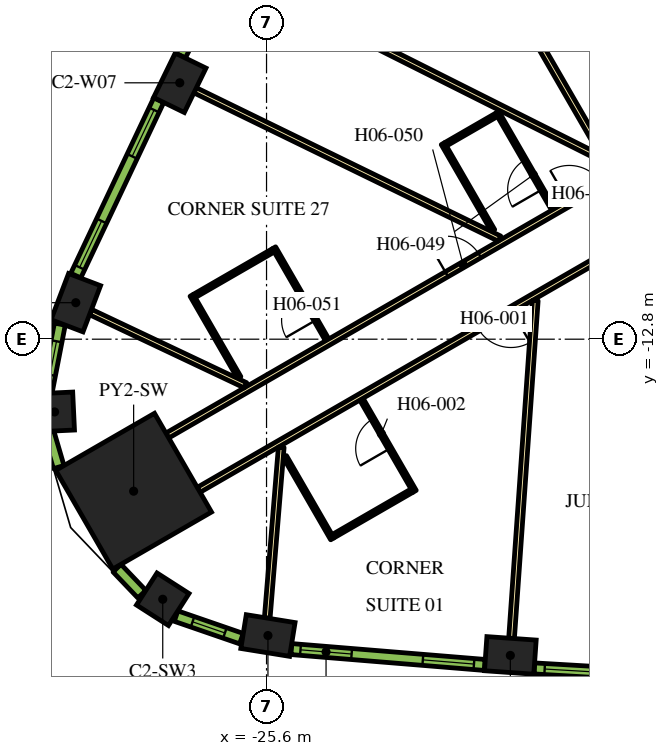
"""IFC4 building model, lengths in metres.
Left out: names, types, materials, properties, quantities, classifications, styles, units other than length and angle.
Written with IfcOpenShell. Run it as: python <this file> out.ifc"""

import sys

from ifc_helpers import new_model, si_unit, direction, frame, frame_2d, origin, origin_2d, place, context, subcontext, project, spatial, rectangle, extrude, element, fill, save


model = new_model("IFC4")
c1 = context("Model", 3, precision=1e-05, world=origin(), true_north=direction((0.0, 1.0)))
c2 = subcontext(c1, "Body", "Model", "MODEL_VIEW")
j1 = project(units=[si_unit("LENGTHUNIT", "METRE"), si_unit("PLANEANGLEUNIT", "RADIAN")], contexts=[c1])
p1 = place(None, origin())
s1 = spatial("IfcSite", under=j1, at=p1, CompositionType="ELEMENT")
p2 = place(p1, origin())
s2 = spatial("IfcBuilding", under=s1, at=p2, CompositionType="ELEMENT")
p3 = place(p2, frame((0.0, 0.0, 87.6)))
s3 = spatial("IfcBuildingStorey", under=s2, at=p3, CompositionType="ELEMENT", Elevation=87.6)
p4 = place(p3, frame((-29.097, -16.799, 0.0), z_axis=(0.0, 0.0, 1.0), x_axis=(-0.866025403784, -0.5, 0.0)))
e1 = element("IfcColumn", 1, at=p4, inside=s3, PredefinedType="COLUMN", context=c2, shape_type="SweptSolid", body=[
    extrude(rectangle(XDim=3.0, YDim=3.0, at=origin_2d()), origin(), (0.0, 0.0, 1.0), 3.9),
])
for number, where, z_axis, x_axis in (
    (2, (-25.563, -20.597, 0.0), (0.0, 0.0, 1.0), (0.987, -0.159, 0.0)),
    (3, (-19.184, -21.12, 0.0), (0.0, 0.0, 1.0), (0.998, -0.07, 0.0)),
    (4, (-27.883, -6.054, 0.0), (0.0, 0.0, 1.0), (-0.438, -0.899, 0.0)),
    (5, (-30.619, -11.839, 0.0), (0.0, 0.0, 1.0), (-0.355, -0.935, 0.0)),
):
    element("IfcColumn", number, at=place(p3, frame(where, z_axis=z_axis, x_axis=x_axis)), inside=s3, PredefinedType="COLUMN", context=c2, shape_type="SweptSolid", body=[
        extrude(rectangle(XDim=1.3, YDim=0.9, at=origin_2d()), origin(), (0.0, 0.0, 1.0), 3.9),
    ])
for number, where, z_axis, x_axis in (
    (6, (-31.177, -14.714, 0.0), (0.0, 0.0, 1.0), (0.047, -0.999, 0.0)),
    (7, (-28.331, -19.643, 0.0), (0.0, 0.0, 1.0), (0.842, -0.54, 0.0)),
):
    element("IfcColumn", number, at=place(p3, frame(where, z_axis=z_axis, x_axis=x_axis)), inside=s3, PredefinedType="COLUMN", context=c2, shape_type="SweptSolid", body=[
        extrude(rectangle(XDim=1.0, YDim=1.0, at=origin_2d()), origin(), (0.0, 0.0, 1.0), 3.9),
    ])
p5 = place(p3, frame((-12.134, -11.883, 0.0), z_axis=(0.0, 0.0, 1.0), x_axis=(-0.500005339912, 0.866022320763, 0.0)))
e8 = element("IfcWall", 8, at=p5, inside=s3, PredefinedType="SOLIDWALL", context=c2, shape_type="SweptSolid", body=[
    extrude(rectangle(XDim=9.488, YDim=0.9, at=frame_2d((4.744, 0.0))), origin(), (0.0, 0.0, 1.0), 3.9),
])
p6 = place(p3, frame((-16.412, -8.523, 0.0), z_axis=(0.0, 0.0, 1.0), x_axis=(-0.500001929737, 0.866024289647, 0.0)))
e9 = element("IfcWall", 9, at=p6, inside=s3, PredefinedType="PARTITIONING", context=c2, shape_type="SweptSolid", body=[
    extrude(rectangle(XDim=5.268, YDim=0.15, at=frame_2d((2.634, 0.0))), origin(), (0.0, 0.0, 1.0), 2.75),
])
p7 = place(p3, frame((-28.211, -15.335, 0.0), z_axis=(0.0, 0.0, 1.0), x_axis=(0.866025884867, 0.49999916674, 0.0)))
e10 = element("IfcWall", 10, at=p7, inside=s3, PredefinedType="PARTITIONING", context=c2, shape_type="SweptSolid", body=[
    extrude(rectangle(XDim=13.543, YDim=0.15, at=frame_2d((6.772, 0.0))), origin(), (0.0, 0.0, 1.0), 2.75),
])
p8 = place(p7, frame((12.214, 0.0, 0.0)))
e11 = element("IfcOpeningElement", 11, at=p8, cuts=e10, PredefinedType="OPENING", context=c2, shape_type="SweptSolid", body=[
    extrude(rectangle(XDim=1.0, YDim=2.1, at=frame_2d((0.5, 1.05))), frame((0.0, 0.085, 0.0), z_axis=(0.0, -1.0, 0.0), x_axis=(1.0, 0.0, 0.0)), (0.0, 0.0, 1.0), 0.17),
])
p9 = place(p7, frame((8.488, 0.0, 0.0)))
e12 = element("IfcOpeningElement", 12, at=p9, cuts=e10, PredefinedType="OPENING", context=c2, shape_type="SweptSolid", body=[
    extrude(rectangle(XDim=1.0, YDim=2.1, at=frame_2d((0.5, 1.05))), frame((0.0, 0.085, 0.0), z_axis=(0.0, -1.0, 0.0), x_axis=(1.0, 0.0, 0.0)), (0.0, 0.0, 1.0), 0.17),
])
p10 = place(p3, frame((-15.587, -9.952, 0.0), z_axis=(0.0, 0.0, 1.0), x_axis=(-0.866017869832, -0.500013048961, 0.0)))
e13 = element("IfcWall", 13, at=p10, inside=s3, PredefinedType="PARTITIONING", context=c2, shape_type="SweptSolid", body=[
    extrude(rectangle(XDim=13.624, YDim=0.15, at=frame_2d((6.812, 0.0))), origin(), (0.0, 0.0, 1.0), 2.75),
])
p11 = place(p10, frame((4.134, 0.0, 0.0)))
e14 = element("IfcOpeningElement", 14, at=p11, cuts=e13, PredefinedType="OPENING", context=c2, shape_type="SweptSolid", body=[
    extrude(rectangle(XDim=1.0, YDim=2.1, at=frame_2d((0.5, 1.05))), frame((0.0, 0.085, 0.0), z_axis=(0.0, -1.0, 0.0), x_axis=(1.0, 0.0, 0.0)), (0.0, 0.0, 1.0), 0.17),
])
p12 = place(p3, frame((-30.231, -12.085, 0.0), z_axis=(0.0, 0.0, 1.0), x_axis=(0.904001132572, -0.427530060122, 0.0)))
e15 = element("IfcWall", 15, at=p12, inside=s3, PredefinedType="PARTITIONING", context=c2, shape_type="SweptSolid", body=[
    extrude(rectangle(XDim=4.51, YDim=0.15, at=frame_2d((2.255, 0.0))), origin(), (0.0, 0.0, 1.0), 2.75),
])
p13 = place(p3, frame((-25.582, -20.138, 0.0), z_axis=(0.0, 0.0, 1.0), x_axis=(0.081746132986, 0.996653184283, 0.0)))
e16 = element("IfcWall", 16, at=p13, inside=s3, PredefinedType="PARTITIONING", context=c2, shape_type="SweptSolid", body=[
    extrude(rectangle(XDim=4.51, YDim=0.15, at=frame_2d((2.255, 0.0))), origin(), (0.0, 0.0, 1.0), 2.75),
])
p14 = place(p3, frame((-27.479, -6.251, 0.0), z_axis=(0.0, 0.0, 1.0), x_axis=(0.898945877276, -0.438059710231, 0.0)))
e17 = element("IfcWall", 17, at=p14, inside=s3, PredefinedType="PARTITIONING", context=c2, shape_type="SweptSolid", body=[
    extrude(rectangle(XDim=8.909, YDim=0.15, at=frame_2d((4.455, 0.0))), origin(), (0.0, 0.0, 1.0), 2.75),
])
p15 = place(p3, frame((-19.153, -20.671, 0.0), z_axis=(0.0, 0.0, 1.0), x_axis=(0.070070736723, 0.997542025107, 0.0)))
e18 = element("IfcWall", 18, at=p15, inside=s3, PredefinedType="PARTITIONING", context=c2, shape_type="SweptSolid", body=[
    extrude(rectangle(XDim=8.909, YDim=0.15, at=frame_2d((4.455, 0.0))), origin(), (0.0, 0.0, 1.0), 2.75),
])
p16 = place(p3, frame((-26.591, -3.122, 0.0), z_axis=(0.0, 0.0, 1.0), x_axis=(0.893766213273, -0.448533115847, 0.0)))
e19 = element("IfcWall", 19, at=p16, inside=s3, PredefinedType="PARTITIONING", context=c2, shape_type="SweptSolid", body=[
    extrude(rectangle(XDim=10.875, YDim=0.15, at=frame_2d((5.438, 0.0))), origin(), (0.0, 0.0, 1.0), 2.75),
])
p17 = place(p3, frame((-21.704, -16.803, 0.0), z_axis=(0.0, 0.0, 1.0), x_axis=(-0.500049511043, 0.865996816683, 0.0)))
e20 = element("IfcWall", 20, at=p17, inside=s3, PredefinedType="PARTITIONING", context=c2, shape_type="SweptSolid", body=[
    extrude(rectangle(XDim=2.8, YDim=0.1, at=frame_2d((1.4, 0.0))), origin(), (0.0, 0.0, 1.0), 2.75),
])
p18 = place(p17, frame((1.3, 0.0, 0.0)))
e21 = element("IfcOpeningElement", 21, at=p18, cuts=e20, PredefinedType="OPENING", context=c2, shape_type="SweptSolid", body=[
    extrude(rectangle(XDim=0.9, YDim=2.1, at=frame_2d((0.45, 1.05))), frame((0.0, 0.06, 0.0), z_axis=(0.0, -1.0, 0.0), x_axis=(1.0, 0.0, 0.0)), (0.0, 0.0, 1.0), 0.12),
])
p19 = place(p3, frame((-21.772, -16.785, 0.0), z_axis=(0.0, 0.0, 1.0), x_axis=(-0.866024647952, -0.500001309137, 0.0)))
e22 = element("IfcWall", 22, at=p19, inside=s3, PredefinedType="PARTITIONING", context=c2, shape_type="SweptSolid", body=[
    extrude(rectangle(XDim=2.4, YDim=0.1, at=frame_2d((1.2, 0.0))), origin(), (0.0, 0.0, 1.0), 2.75),
])
p20 = place(p3, frame((-25.119, -15.888, 0.0), z_axis=(0.0, 0.0, 1.0), x_axis=(0.500046524342, -0.865998541277, 0.0)))
e23 = element("IfcWall", 23, at=p20, inside=s3, PredefinedType="PARTITIONING", context=c2, shape_type="SweptSolid", body=[
    extrude(rectangle(XDim=2.5, YDim=0.1, at=frame_2d((1.25, 0.0))), origin(), (0.0, 0.0, 1.0), 2.75),
])
p21 = place(p3, frame((-18.055, -9.385, 0.0), z_axis=(0.0, 0.0, 1.0), x_axis=(-0.499939757307, 0.866060182126, 0.0)))
e24 = element("IfcWall", 24, at=p21, inside=s3, PredefinedType="PARTITIONING", context=c2, shape_type="SweptSolid", body=[
    extrude(rectangle(XDim=2.95, YDim=0.1, at=frame_2d((1.475, 0.0))), origin(), (0.0, 0.0, 1.0), 2.75),
])
p22 = place(p21, frame((0.6, 0.0, 0.0)))
e25 = element("IfcOpeningElement", 25, at=p22, cuts=e24, PredefinedType="OPENING", context=c2, shape_type="SweptSolid", body=[
    extrude(rectangle(XDim=0.9, YDim=2.1, at=frame_2d((0.45, 1.05))), frame((0.0, 0.06, 0.0), z_axis=(0.0, -1.0, 0.0), x_axis=(1.0, 0.0, 0.0)), (0.0, 0.0, 1.0), 0.12),
])
p23 = place(p3, frame((-19.549, -6.898, 0.0), z_axis=(0.0, 0.0, 1.0), x_axis=(-0.866043940782, -0.499967891604, 0.0)))
e26 = element("IfcWall", 26, at=p23, inside=s3, PredefinedType="PARTITIONING", context=c2, shape_type="SweptSolid", body=[
    extrude(rectangle(XDim=1.55, YDim=0.1, at=frame_2d((0.775, 0.0))), origin(), (0.0, 0.0, 1.0), 2.75),
])
p24 = place(p3, frame((-19.639, -9.941, 0.0), z_axis=(0.0, 0.0, 1.0), x_axis=(-0.499938597367, 0.866060851709, 0.0)))
e27 = element("IfcWall", 27, at=p24, inside=s3, PredefinedType="PARTITIONING", context=c2, shape_type="SweptSolid", body=[
    extrude(rectangle(XDim=2.64, YDim=0.1, at=frame_2d((1.32, 0.0))), origin(), (0.0, 0.0, 1.0), 2.75),
])
p25 = place(p3, frame((-24.004, -12.82, 0.0), z_axis=(0.0, 0.0, 1.0), x_axis=(-0.500011755427, 0.866018616679, 0.0)))
e28 = element("IfcWall", 28, at=p25, inside=s3, PredefinedType="PARTITIONING", context=c2, shape_type="SweptSolid", body=[
    extrude(rectangle(XDim=2.8, YDim=0.1, at=frame_2d((1.4, 0.0))), origin(), (0.0, 0.0, 1.0), 2.75),
])
p26 = place(p25, frame((0.6, 0.0, 0.0)))
e29 = element("IfcOpeningElement", 29, at=p26, cuts=e28, PredefinedType="OPENING", context=c2, shape_type="SweptSolid", body=[
    extrude(rectangle(XDim=0.9, YDim=2.1, at=frame_2d((0.45, 1.05))), frame((0.0, 0.06, 0.0), z_axis=(0.0, -1.0, 0.0), x_axis=(1.0, 0.0, 0.0)), (0.0, 0.0, 1.0), 0.12),
])
p27 = place(p3, frame((-25.422, -10.463, 0.0), z_axis=(0.0, 0.0, 1.0), x_axis=(-0.866024647952, -0.500001309137, 0.0)))
e30 = element("IfcWall", 30, at=p27, inside=s3, PredefinedType="PARTITIONING", context=c2, shape_type="SweptSolid", body=[
    extrude(rectangle(XDim=2.4, YDim=0.1, at=frame_2d((1.2, 0.0))), origin(), (0.0, 0.0, 1.0), 2.75),
])
p28 = place(p3, frame((-26.319, -13.81, 0.0), z_axis=(0.0, 0.0, 1.0), x_axis=(-0.499961950354, 0.866047370643, 0.0)))
e31 = element("IfcWall", 31, at=p28, inside=s3, PredefinedType="PARTITIONING", context=c2, shape_type="SweptSolid", body=[
    extrude(rectangle(XDim=2.5, YDim=0.1, at=frame_2d((1.25, 0.0))), origin(), (0.0, 0.0, 1.0), 2.75),
])
p29 = place(p3, frame((-24.946, -20.954, 0.0), z_axis=(0.0, 0.0, 1.0), x_axis=(0.99665273362, -0.081751627308, 0.0)))
e32 = element("IfcWall", 32, at=p29, inside=s3, PredefinedType="SOLIDWALL", context=c2, shape_type="SweptSolid", body=[
    extrude(rectangle(XDim=5.107, YDim=0.29, at=frame_2d((2.553, 0.0))), origin(), (0.0, 0.0, 1.0), 3.65),
])
p30 = place(p29, frame((0.24, 0.0, 0.9)))
e33 = element("IfcOpeningElement", 33, at=p30, cuts=e32, PredefinedType="OPENING", context=c2, shape_type="SweptSolid", body=[
    extrude(rectangle(XDim=1.35, YDim=2.15, at=frame_2d((0.675, 1.075))), frame((0.0, 0.155, 0.0), z_axis=(0.0, -1.0, 0.0), x_axis=(1.0, 0.0, 0.0)), (0.0, 0.0, 1.0), 0.31),
])
p31 = place(p29, frame((3.471, 0.0, 0.9)))
e34 = element("IfcOpeningElement", 34, at=p31, cuts=e32, PredefinedType="OPENING", context=c2, shape_type="SweptSolid", body=[
    extrude(rectangle(XDim=1.35, YDim=2.15, at=frame_2d((0.675, 1.075))), frame((0.0, 0.155, 0.0), z_axis=(0.0, -1.0, 0.0), x_axis=(1.0, 0.0, 0.0)), (0.0, 0.0, 1.0), 0.31),
])
p32 = place(p3, frame((-18.553, -21.463, 0.0), z_axis=(0.0, 0.0, 1.0), x_axis=(0.998290511436, -0.058447025388, 0.0)))
e35 = element("IfcWall", 35, at=p32, inside=s3, PredefinedType="SOLIDWALL", context=c2, shape_type="SweptSolid", body=[
    extrude(rectangle(XDim=5.1, YDim=0.29, at=frame_2d((2.55, 0.0))), origin(), (0.0, 0.0, 1.0), 3.65),
])
p33 = place(p32, frame((0.273, 0.0, 0.9)))
e36 = element("IfcOpeningElement", 36, at=p33, cuts=e35, PredefinedType="OPENING", context=c2, shape_type="SweptSolid", body=[
    extrude(rectangle(XDim=1.35, YDim=2.15, at=frame_2d((0.675, 1.075))), frame((0.0, 0.155, 0.0), z_axis=(0.0, -1.0, 0.0), x_axis=(1.0, 0.0, 0.0)), (0.0, 0.0, 1.0), 0.31),
])
p34 = place(p32, frame((3.478, 0.0, 0.9)))
e37 = element("IfcOpeningElement", 37, at=p34, cuts=e35, PredefinedType="OPENING", context=c2, shape_type="SweptSolid", body=[
    extrude(rectangle(XDim=1.35, YDim=2.15, at=frame_2d((0.675, 1.075))), frame((0.0, 0.155, 0.0), z_axis=(0.0, -1.0, 0.0), x_axis=(1.0, 0.0, 0.0)), (0.0, 0.0, 1.0), 0.31),
])
p35 = place(p3, frame((-25.576, -0.778, 0.0), z_axis=(0.0, 0.0, 1.0), x_axis=(-0.448534297211, -0.893765620409, 0.0)))
e38 = element("IfcWall", 38, at=p35, inside=s3, PredefinedType="SOLIDWALL", context=c2, shape_type="SweptSolid", body=[
    extrude(rectangle(XDim=5.1, YDim=0.29, at=frame_2d((2.55, 0.0))), origin(), (0.0, 0.0, 1.0), 3.65),
])
p36 = place(p35, frame((0.272, 0.0, 0.9)))
e39 = element("IfcOpeningElement", 39, at=p36, cuts=e38, PredefinedType="OPENING", context=c2, shape_type="SweptSolid", body=[
    extrude(rectangle(XDim=1.35, YDim=2.15, at=frame_2d((0.675, 1.075))), frame((0.0, 0.155, 0.0), z_axis=(0.0, -1.0, 0.0), x_axis=(1.0, 0.0, 0.0)), (0.0, 0.0, 1.0), 0.31),
])
p37 = place(p35, frame((3.478, 0.0, 0.9)))
e40 = element("IfcOpeningElement", 40, at=p37, cuts=e38, PredefinedType="OPENING", context=c2, shape_type="SweptSolid", body=[
    extrude(rectangle(XDim=1.35, YDim=2.15, at=frame_2d((0.675, 1.075))), frame((0.0, 0.155, 0.0), z_axis=(0.0, -1.0, 0.0), x_axis=(1.0, 0.0, 0.0)), (0.0, 0.0, 1.0), 0.31),
])
p38 = place(p3, frame((-28.436, -6.511, 0.0), z_axis=(0.0, 0.0, 1.0), x_axis=(-0.427543726596, -0.903994669148, 0.0)))
e41 = element("IfcWall", 41, at=p38, inside=s3, PredefinedType="SOLIDWALL", context=c2, shape_type="SweptSolid", body=[
    extrude(rectangle(XDim=5.107, YDim=0.29, at=frame_2d((2.553, 0.0))), origin(), (0.0, 0.0, 1.0), 3.65),
])
p39 = place(p38, frame((0.285, 0.0, 0.9)))
e42 = element("IfcOpeningElement", 42, at=p39, cuts=e41, PredefinedType="OPENING", context=c2, shape_type="SweptSolid", body=[
    extrude(rectangle(XDim=1.35, YDim=2.15, at=frame_2d((0.675, 1.075))), frame((0.0, 0.155, 0.0), z_axis=(0.0, -1.0, 0.0), x_axis=(1.0, 0.0, 0.0)), (0.0, 0.0, 1.0), 0.31),
])
p40 = place(p38, frame((3.516, 0.0, 0.9)))
e43 = element("IfcOpeningElement", 43, at=p40, cuts=e41, PredefinedType="OPENING", context=c2, shape_type="SweptSolid", body=[
    extrude(rectangle(XDim=1.35, YDim=2.15, at=frame_2d((0.675, 1.075))), frame((0.0, 0.155, 0.0), z_axis=(0.0, -1.0, 0.0), x_axis=(1.0, 0.0, 0.0)), (0.0, 0.0, 1.0), 0.31),
])
p41 = place(p3, frame((-31.039, -12.403, 0.0), z_axis=(0.0, 0.0, 1.0), x_axis=(-0.190409913989, -0.981704672829, 0.0)))
e44 = element("IfcWall", 44, at=p41, inside=s3, PredefinedType="SOLIDWALL", context=c2, shape_type="SweptSolid", body=[
    extrude(rectangle(XDim=1.819, YDim=0.29, at=frame_2d((0.91, 0.0))), origin(), (0.0, 0.0, 1.0), 3.65),
])
p42 = place(p41, frame((0.46, 0.0, 0.9)))
e45 = element("IfcOpeningElement", 45, at=p42, cuts=e44, PredefinedType="OPENING", context=c2, shape_type="SweptSolid", body=[
    extrude(rectangle(XDim=0.9, YDim=2.15, at=frame_2d((0.45, 1.075))), frame((0.0, 0.155, 0.0), z_axis=(0.0, -1.0, 0.0), x_axis=(1.0, 0.0, 0.0)), (0.0, 0.0, 1.0), 0.31),
])
p43 = place(p3, frame((-31.336, -15.256, 0.0), z_axis=(0.0, 0.0, 1.0), x_axis=(0.281454582132, -0.95957455062, 0.0)))
e46 = element("IfcWall", 46, at=p43, inside=s3, PredefinedType="SOLIDWALL", context=c2, shape_type="SweptSolid", body=[
    extrude(rectangle(XDim=0.947, YDim=0.29, at=frame_2d((0.474, 0.0))), origin(), (0.0, 0.0, 1.0), 3.65),
])
p44 = place(p3, frame((-29.534, -18.824, 0.0), z_axis=(0.0, 0.0, 1.0), x_axis=(0.690414427296, -0.723414071319, 0.0)))
e47 = element("IfcWall", 47, at=p44, inside=s3, PredefinedType="SOLIDWALL", context=c2, shape_type="SweptSolid", body=[
    extrude(rectangle(XDim=0.947, YDim=0.29, at=frame_2d((0.474, 0.0))), origin(), (0.0, 0.0, 1.0), 3.65),
])
p45 = place(p3, frame((-27.981, -20.086, 0.0), z_axis=(0.0, 0.0, 1.0), x_axis=(0.945385815453, -0.325953462844, 0.0)))
e48 = element("IfcWall", 48, at=p45, inside=s3, PredefinedType="SOLIDWALL", context=c2, shape_type="SweptSolid", body=[
    extrude(rectangle(XDim=1.819, YDim=0.29, at=frame_2d((0.91, 0.0))), origin(), (0.0, 0.0, 1.0), 3.65),
])
p46 = place(p45, frame((0.46, 0.0, 0.9)))
e49 = element("IfcOpeningElement", 49, at=p46, cuts=e48, PredefinedType="OPENING", context=c2, shape_type="SweptSolid", body=[
    extrude(rectangle(XDim=0.9, YDim=2.15, at=frame_2d((0.45, 1.075))), frame((0.0, 0.155, 0.0), z_axis=(0.0, -1.0, 0.0), x_axis=(1.0, 0.0, 0.0)), (0.0, 0.0, 1.0), 0.31),
])
p47 = place(p11, origin())
e50 = element("IfcDoor", 50, at=p47, inside=s3, OperationType="SINGLE_SWING_LEFT", PredefinedType="DOOR", context=c2, shape_type="SweptSolid", body=[
    extrude(rectangle(XDim=1.0, YDim=2.1, at=frame_2d((0.5, 1.05))), frame((0.0, 0.025, 0.0), z_axis=(0.0, -1.0, 0.0), x_axis=(1.0, 0.0, 0.0)), (0.0, 0.0, 1.0), 0.05),
])
fill(e14, e50)
p48 = place(p18, origin())
e51 = element("IfcDoor", 51, at=p48, inside=s3, OperationType="SINGLE_SWING_LEFT", PredefinedType="DOOR", context=c2, shape_type="SweptSolid", body=[
    extrude(rectangle(XDim=0.9, YDim=2.1, at=frame_2d((0.45, 1.05))), frame((0.0, 0.025, 0.0), z_axis=(0.0, -1.0, 0.0), x_axis=(1.0, 0.0, 0.0)), (0.0, 0.0, 1.0), 0.05),
])
fill(e21, e51)
p49 = place(p8, origin())
e52 = element("IfcDoor", 52, at=p49, inside=s3, OperationType="SINGLE_SWING_RIGHT", PredefinedType="DOOR", context=c2, shape_type="SweptSolid", body=[
    extrude(rectangle(XDim=1.0, YDim=2.1, at=frame_2d((0.5, 1.05))), frame((0.0, 0.025, 0.0), z_axis=(0.0, -1.0, 0.0), x_axis=(1.0, 0.0, 0.0)), (0.0, 0.0, 1.0), 0.05),
])
fill(e11, e52)
p50 = place(p22, origin())
e53 = element("IfcDoor", 53, at=p50, inside=s3, OperationType="SINGLE_SWING_LEFT", PredefinedType="DOOR", context=c2, shape_type="SweptSolid", body=[
    extrude(rectangle(XDim=0.9, YDim=2.1, at=frame_2d((0.45, 1.05))), frame((0.0, 0.025, 0.0), z_axis=(0.0, -1.0, 0.0), x_axis=(1.0, 0.0, 0.0)), (0.0, 0.0, 1.0), 0.05),
])
fill(e25, e53)
p51 = place(p9, origin())
e54 = element("IfcDoor", 54, at=p51, inside=s3, OperationType="SINGLE_SWING_RIGHT", PredefinedType="DOOR", context=c2, shape_type="SweptSolid", body=[
    extrude(rectangle(XDim=1.0, YDim=2.1, at=frame_2d((0.5, 1.05))), frame((0.0, 0.025, 0.0), z_axis=(0.0, -1.0, 0.0), x_axis=(1.0, 0.0, 0.0)), (0.0, 0.0, 1.0), 0.05),
])
fill(e12, e54)
p52 = place(p26, origin())
e55 = element("IfcDoor", 55, at=p52, inside=s3, OperationType="SINGLE_SWING_RIGHT", PredefinedType="DOOR", context=c2, shape_type="SweptSolid", body=[
    extrude(rectangle(XDim=0.9, YDim=2.1, at=frame_2d((0.45, 1.05))), frame((0.0, 0.025, 0.0), z_axis=(0.0, -1.0, 0.0), x_axis=(1.0, 0.0, 0.0)), (0.0, 0.0, 1.0), 0.05),
])
fill(e29, e55)
p53 = place(p30, origin())
e56 = element("IfcWindow", 56, at=p53, inside=s3, PartitioningType="DOUBLE_PANEL_VERTICAL", PredefinedType="WINDOW", context=c2, shape_type="SweptSolid", body=[
    extrude(rectangle(XDim=1.35, YDim=2.15, at=frame_2d((0.675, 1.075))), frame((0.0, 0.015, 0.0), z_axis=(0.0, -1.0, 0.0), x_axis=(1.0, 0.0, 0.0)), (0.0, 0.0, 1.0), 0.06),
])
fill(e33, e56)
p54 = place(p31, origin())
e57 = element("IfcWindow", 57, at=p54, inside=s3, PartitioningType="DOUBLE_PANEL_VERTICAL", PredefinedType="WINDOW", context=c2, shape_type="SweptSolid", body=[
    extrude(rectangle(XDim=1.35, YDim=2.15, at=frame_2d((0.675, 1.075))), frame((0.0, 0.015, 0.0), z_axis=(0.0, -1.0, 0.0), x_axis=(1.0, 0.0, 0.0)), (0.0, 0.0, 1.0), 0.06),
])
fill(e34, e57)
p55 = place(p33, origin())
e58 = element("IfcWindow", 58, at=p55, inside=s3, PartitioningType="DOUBLE_PANEL_VERTICAL", PredefinedType="WINDOW", context=c2, shape_type="SweptSolid", body=[
    extrude(rectangle(XDim=1.35, YDim=2.15, at=frame_2d((0.675, 1.075))), frame((0.0, 0.015, 0.0), z_axis=(0.0, -1.0, 0.0), x_axis=(1.0, 0.0, 0.0)), (0.0, 0.0, 1.0), 0.06),
])
fill(e36, e58)
p56 = place(p39, origin())
e59 = element("IfcWindow", 59, at=p56, inside=s3, PartitioningType="DOUBLE_PANEL_VERTICAL", PredefinedType="WINDOW", context=c2, shape_type="SweptSolid", body=[
    extrude(rectangle(XDim=1.35, YDim=2.15, at=frame_2d((0.675, 1.075))), frame((0.0, 0.015, 0.0), z_axis=(0.0, -1.0, 0.0), x_axis=(1.0, 0.0, 0.0)), (0.0, 0.0, 1.0), 0.06),
])
fill(e42, e59)
p57 = place(p40, origin())
e60 = element("IfcWindow", 60, at=p57, inside=s3, PartitioningType="DOUBLE_PANEL_VERTICAL", PredefinedType="WINDOW", context=c2, shape_type="SweptSolid", body=[
    extrude(rectangle(XDim=1.35, YDim=2.15, at=frame_2d((0.675, 1.075))), frame((0.0, 0.015, 0.0), z_axis=(0.0, -1.0, 0.0), x_axis=(1.0, 0.0, 0.0)), (0.0, 0.0, 1.0), 0.06),
])
fill(e43, e60)
p58 = place(p42, origin())
e61 = element("IfcWindow", 61, at=p58, inside=s3, PartitioningType="SINGLE_PANEL", PredefinedType="WINDOW", context=c2, shape_type="SweptSolid", body=[
    extrude(rectangle(XDim=0.9, YDim=2.15, at=frame_2d((0.45, 1.075))), frame((0.0, 0.015, 0.0), z_axis=(0.0, -1.0, 0.0), x_axis=(1.0, 0.0, 0.0)), (0.0, 0.0, 1.0), 0.06),
])
fill(e45, e61)
p59 = place(p46, origin())
e62 = element("IfcWindow", 62, at=p59, inside=s3, PartitioningType="SINGLE_PANEL", PredefinedType="WINDOW", context=c2, shape_type="SweptSolid", body=[
    extrude(rectangle(XDim=0.9, YDim=2.15, at=frame_2d((0.45, 1.075))), frame((0.0, 0.015, 0.0), z_axis=(0.0, -1.0, 0.0), x_axis=(1.0, 0.0, 0.0)), (0.0, 0.0, 1.0), 0.06),
])
fill(e49, e62)
save(model, sys.argv[1])
